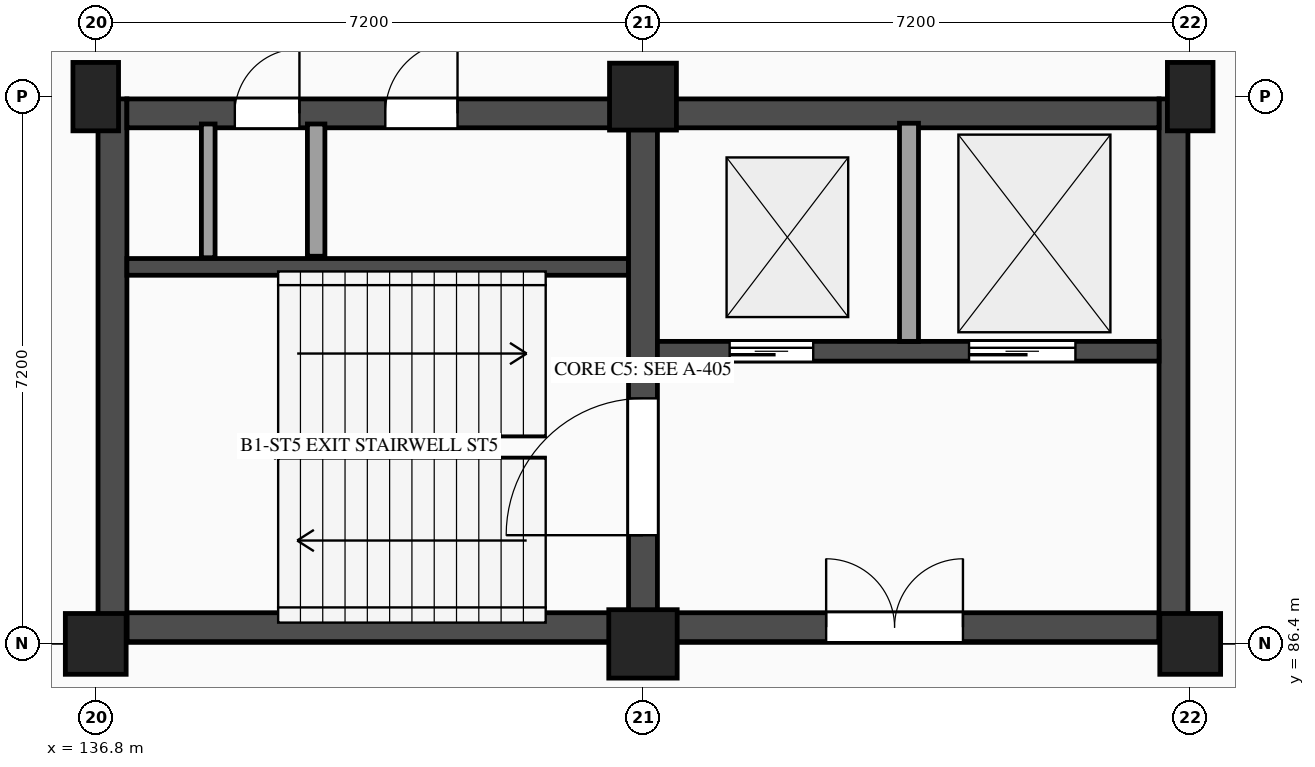
"""IFC4 building model, lengths in metres.
Left out: names, types, materials, properties, quantities, classifications, styles, units other than length and angle.
Written with IfcOpenShell. Run it as: python <this file> out.ifc"""

import sys

from ifc_helpers import new_model, si_unit, direction, frame, frame_2d, origin, origin_2d, place, context, subcontext, project, spatial, rectangle, extrude, element, fill, save


model = new_model("IFC4")
c1 = context("Model", 3, precision=1e-05, world=origin(), true_north=direction((0.0, 1.0)))
c2 = subcontext(c1, "Body", "Model", "MODEL_VIEW")
j1 = project(units=[si_unit("LENGTHUNIT", "METRE"), si_unit("PLANEANGLEUNIT", "RADIAN")], contexts=[c1])
p1 = place(None, origin())
s1 = spatial("IfcSite", under=j1, at=p1, CompositionType="ELEMENT")
p2 = place(p1, origin())
s2 = spatial("IfcBuilding", under=s1, at=p2, CompositionType="ELEMENT")
p3 = place(p2, frame((0.0, 0.0, -4.5)))
s3 = spatial("IfcBuildingStorey", under=s2, at=p3, CompositionType="ELEMENT", Elevation=-4.5)
p4 = place(p3, frame((136.8, 86.4, -0.45), z_axis=(0.0, 0.0, 1.0), x_axis=(1.0, 0.0, 0.0)))
e1 = element("IfcColumn", 1, at=p4, inside=s3, PredefinedType="COLUMN", context=c2, shape_type="SweptSolid", body=[
    extrude(rectangle(XDim=0.8, YDim=0.8, at=origin_2d()), origin(), (0.0, 0.0, 1.0), 4.95),
])
p5 = place(p3, frame((136.8, 93.6, -0.45), z_axis=(0.0, 0.0, 1.0), x_axis=(1.0, 0.0, 0.0)))
e2 = element("IfcColumn", 2, at=p5, inside=s3, PredefinedType="COLUMN", context=c2, shape_type="SweptSolid", body=[
    extrude(rectangle(XDim=0.6, YDim=0.9, at=origin_2d()), origin(), (0.0, 0.0, 1.0), 4.95),
])
p6 = place(p3, frame((144.0, 86.4, -0.45), z_axis=(0.0, 0.0, 1.0), x_axis=(1.0, 0.0, 0.0)))
e3 = element("IfcColumn", 3, at=p6, inside=s3, PredefinedType="COLUMN", context=c2, shape_type="SweptSolid", body=[
    extrude(rectangle(XDim=0.9, YDim=0.9, at=origin_2d()), origin(), (0.0, 0.0, 1.0), 4.95),
])
p7 = place(p3, frame((144.0, 93.6, -0.45), z_axis=(0.0, 0.0, 1.0), x_axis=(1.0, 0.0, 0.0)))
e4 = element("IfcColumn", 4, at=p7, inside=s3, PredefinedType="COLUMN", context=c2, shape_type="SweptSolid", body=[
    extrude(rectangle(XDim=0.88, YDim=0.88, at=origin_2d()), origin(), (0.0, 0.0, 1.0), 4.95),
])
p8 = place(p3, frame((151.2, 86.4, -0.45), z_axis=(0.0, 0.0, 1.0), x_axis=(1.0, 0.0, 0.0)))
e5 = element("IfcColumn", 5, at=p8, inside=s3, PredefinedType="COLUMN", context=c2, shape_type="SweptSolid", body=[
    extrude(rectangle(XDim=0.8, YDim=0.8, at=origin_2d()), origin(), (0.0, 0.0, 1.0), 4.95),
])
p9 = place(p3, frame((151.2, 93.6, -0.45), z_axis=(0.0, 0.0, 1.0), x_axis=(1.0, 0.0, 0.0)))
e6 = element("IfcColumn", 6, at=p9, inside=s3, PredefinedType="COLUMN", context=c2, shape_type="SweptSolid", body=[
    extrude(rectangle(XDim=0.6, YDim=0.9, at=origin_2d()), origin(), (0.0, 0.0, 1.0), 4.95),
])
p10 = place(p3, frame((137.21, 86.62, 0.0), z_axis=(0.0, 0.0, 1.0), x_axis=(1.0, 0.0, 0.0)))
e7 = element("IfcWall", 7, at=p10, inside=s3, PredefinedType="SHEAR", context=c2, shape_type="SweptSolid", body=[
    extrude(rectangle(XDim=6.6, YDim=0.38, at=frame_2d((3.3, 0.0))), origin(), (0.0, 0.0, 1.0), 4.19),
])
p11 = place(p3, frame((137.02, 93.57, 0.0), z_axis=(0.0, 0.0, 1.0), x_axis=(0.0, -1.0, 0.0)))
e8 = element("IfcWall", 8, at=p11, inside=s3, PredefinedType="SHEAR", context=c2, shape_type="SweptSolid", body=[
    extrude(rectangle(XDim=7.14, YDim=0.38, at=frame_2d((3.57, 0.0))), origin(), (0.0, 0.0, 1.0), 4.19),
])
p12 = place(p3, frame((137.21, 93.38, 0.0), z_axis=(0.0, 0.0, 1.0), x_axis=(1.0, 0.0, 0.0)))
e9 = element("IfcWall", 9, at=p12, inside=s3, PredefinedType="SHEAR", context=c2, shape_type="SweptSolid", body=[
    extrude(rectangle(XDim=6.6, YDim=0.38, at=frame_2d((3.3, 0.0))), origin(), (0.0, 0.0, 1.0), 4.19),
])
p13 = place(p12, frame((1.42, 0.0, 0.0)))
e10 = element("IfcOpeningElement", 10, at=p13, cuts=e9, PredefinedType="OPENING", context=c2, shape_type="SweptSolid", body=[
    extrude(rectangle(XDim=0.85, YDim=2.1, at=frame_2d((0.425, 1.05))), frame((0.0, 0.2, 0.0), z_axis=(0.0, -1.0, 0.0), x_axis=(1.0, 0.0, 0.0)), (0.0, 0.0, 1.0), 0.4),
])
p14 = place(p12, frame((3.4, 0.0, 0.0)))
e11 = element("IfcOpeningElement", 11, at=p14, cuts=e9, PredefinedType="OPENING", context=c2, shape_type="SweptSolid", body=[
    extrude(rectangle(XDim=0.95, YDim=2.15, at=frame_2d((0.475, 1.075))), frame((0.0, 0.2, 0.0), z_axis=(0.0, -1.0, 0.0), x_axis=(1.0, 0.0, 0.0)), (0.0, 0.0, 1.0), 0.4),
])
p15 = place(p3, frame((137.21, 91.36, 0.0), z_axis=(0.0, 0.0, 1.0), x_axis=(1.0, 0.0, 0.0)))
e12 = element("IfcWall", 12, at=p15, inside=s3, PredefinedType="SHEAR", context=c2, shape_type="SweptSolid", body=[
    extrude(rectangle(XDim=6.6, YDim=0.22, at=frame_2d((3.3, 0.0))), origin(), (0.0, 0.0, 1.0), 4.19),
])
p16 = place(p3, frame((139.7, 91.5, 0.0), z_axis=(0.0, 0.0, 1.0), x_axis=(0.0, 1.0, 0.0)))
e13 = element("IfcWall", 13, at=p16, inside=s3, PredefinedType="PARTITIONING", context=c2, shape_type="SweptSolid", body=[
    extrude(rectangle(XDim=1.74, YDim=0.23, at=frame_2d((0.87, 0.0))), origin(), (0.0, 0.0, 1.0), 4.19),
])
p17 = place(p3, frame((138.28, 91.48, 0.0), z_axis=(0.0, 0.0, 1.0), x_axis=(0.0, 1.0, 0.0)))
e14 = element("IfcWall", 14, at=p17, inside=s3, PredefinedType="PARTITIONING", context=c2, shape_type="SweptSolid", body=[
    extrude(rectangle(XDim=1.76, YDim=0.18, at=frame_2d((0.88, 0.0))), origin(), (0.0, 0.0, 1.0), 4.19),
])
p18 = place(p3, frame((144.0, 86.43, 0.0), z_axis=(0.0, 0.0, 1.0), x_axis=(0.0, 1.0, 0.0)))
e15 = element("IfcWall", 15, at=p18, inside=s3, PredefinedType="SHEAR", context=c2, shape_type="SweptSolid", body=[
    extrude(rectangle(XDim=7.14, YDim=0.38, at=frame_2d((3.57, 0.0))), origin(), (0.0, 0.0, 1.0), 4.19),
])
p19 = place(p18, frame((1.4, 0.0, 0.0)))
e16 = element("IfcOpeningElement", 16, at=p19, cuts=e15, PredefinedType="OPENING", context=c2, shape_type="SweptSolid", body=[
    extrude(rectangle(XDim=1.8, YDim=2.2, at=frame_2d((0.9, 1.1))), frame((0.0, 0.2, 0.0), z_axis=(0.0, -1.0, 0.0), x_axis=(1.0, 0.0, 0.0)), (0.0, 0.0, 1.0), 0.4),
])
p20 = place(p3, frame((144.19, 86.62, 0.0), z_axis=(0.0, 0.0, 1.0), x_axis=(1.0, 0.0, 0.0)))
e17 = element("IfcWall", 17, at=p20, inside=s3, PredefinedType="SHEAR", context=c2, shape_type="SweptSolid", body=[
    extrude(rectangle(XDim=6.6, YDim=0.38, at=frame_2d((3.3, 0.0))), origin(), (0.0, 0.0, 1.0), 4.19),
])
p21 = place(p20, frame((2.22, 0.0, 0.0)))
e18 = element("IfcOpeningElement", 18, at=p21, cuts=e17, PredefinedType="OPENING", context=c2, shape_type="SweptSolid", body=[
    extrude(rectangle(XDim=1.8, YDim=2.2, at=frame_2d((0.9, 1.1))), frame((0.0, 0.2, 0.0), z_axis=(0.0, -1.0, 0.0), x_axis=(1.0, 0.0, 0.0)), (0.0, 0.0, 1.0), 0.4),
])
p22 = place(p3, frame((150.98, 86.43, 0.0), z_axis=(0.0, 0.0, 1.0), x_axis=(0.0, 1.0, 0.0)))
e19 = element("IfcWall", 19, at=p22, inside=s3, PredefinedType="SHEAR", context=c2, shape_type="SweptSolid", body=[
    extrude(rectangle(XDim=7.14, YDim=0.38, at=frame_2d((3.57, 0.0))), origin(), (0.0, 0.0, 1.0), 4.19),
])
p23 = place(p3, frame((144.19, 93.38, 0.0), z_axis=(0.0, 0.0, 1.0), x_axis=(1.0, 0.0, 0.0)))
e20 = element("IfcWall", 20, at=p23, inside=s3, PredefinedType="SHEAR", context=c2, shape_type="SweptSolid", body=[
    extrude(rectangle(XDim=6.6, YDim=0.38, at=frame_2d((3.3, 0.0))), origin(), (0.0, 0.0, 1.0), 4.19),
])
p24 = place(p3, frame((144.19, 90.25, 0.0), z_axis=(0.0, 0.0, 1.0), x_axis=(1.0, 0.0, 0.0)))
e21 = element("IfcWall", 21, at=p24, inside=s3, PredefinedType="SHEAR", context=c2, shape_type="SweptSolid", body=[
    extrude(rectangle(XDim=6.6, YDim=0.26, at=frame_2d((3.3, 0.0))), origin(), (0.0, 0.0, 1.0), 4.19),
])
p25 = place(p24, frame((0.95, 0.0, 0.0)))
e22 = element("IfcOpeningElement", 22, at=p25, cuts=e21, PredefinedType="OPENING", context=c2, shape_type="SweptSolid", body=[
    extrude(rectangle(XDim=1.1, YDim=2.2, at=frame_2d((0.55, 1.1))), frame((0.0, 0.14, 0.0), z_axis=(0.0, -1.0, 0.0), x_axis=(1.0, 0.0, 0.0)), (0.0, 0.0, 1.0), 0.28),
])
p26 = place(p24, frame((4.1, 0.0, 0.0)))
e23 = element("IfcOpeningElement", 23, at=p26, cuts=e21, PredefinedType="OPENING", context=c2, shape_type="SweptSolid", body=[
    extrude(rectangle(XDim=1.4, YDim=2.3, at=frame_2d((0.7, 1.15))), frame((0.0, 0.14, 0.0), z_axis=(0.0, -1.0, 0.0), x_axis=(1.0, 0.0, 0.0)), (0.0, 0.0, 1.0), 0.28),
])
p27 = place(p3, frame((147.5, 90.38, 0.0), z_axis=(0.0, 0.0, 1.0), x_axis=(0.0, 1.0, 0.0)))
e24 = element("IfcWall", 24, at=p27, inside=s3, PredefinedType="PARTITIONING", context=c2, shape_type="SweptSolid", body=[
    extrude(rectangle(XDim=2.87, YDim=0.25, at=frame_2d((1.435, 0.0))), origin(), (0.0, 0.0, 1.0), 4.19),
])
p28 = place(p13, origin())
e25 = element("IfcDoor", 25, at=p28, inside=s3, OperationType="SINGLE_SWING_RIGHT", PredefinedType="DOOR", context=c2, shape_type="SweptSolid", body=[
    extrude(rectangle(XDim=0.85, YDim=2.1, at=frame_2d((0.425, 1.05))), frame((0.0, 0.025, 0.0), z_axis=(0.0, -1.0, 0.0), x_axis=(1.0, 0.0, 0.0)), (0.0, 0.0, 1.0), 0.05),
])
fill(e10, e25)
p29 = place(p19, origin())
e26 = element("IfcDoor", 26, at=p29, inside=s3, OperationType="SINGLE_SWING_LEFT", PredefinedType="DOOR", context=c2, shape_type="SweptSolid", body=[
    extrude(rectangle(XDim=1.8, YDim=2.2, at=frame_2d((0.9, 1.1))), frame((0.0, 0.025, 0.0), z_axis=(0.0, -1.0, 0.0), x_axis=(1.0, 0.0, 0.0)), (0.0, 0.0, 1.0), 0.05),
])
fill(e16, e26)
p30 = place(p14, origin())
e27 = element("IfcDoor", 27, at=p30, inside=s3, OperationType="SINGLE_SWING_RIGHT", PredefinedType="DOOR", context=c2, shape_type="SweptSolid", body=[
    extrude(rectangle(XDim=0.95, YDim=2.15, at=frame_2d((0.475, 1.075))), frame((0.0, 0.025, 0.0), z_axis=(0.0, -1.0, 0.0), x_axis=(1.0, 0.0, 0.0)), (0.0, 0.0, 1.0), 0.05),
])
fill(e11, e27)
p31 = place(p25, origin())
e28 = element("IfcDoor", 28, at=p31, inside=s3, OperationType="SLIDING_TO_LEFT", PredefinedType="DOOR", context=c2, shape_type="SweptSolid", body=[
    extrude(rectangle(XDim=1.1, YDim=2.2, at=frame_2d((0.55, 1.1))), frame((0.0, 0.025, 0.0), z_axis=(0.0, -1.0, 0.0), x_axis=(1.0, 0.0, 0.0)), (0.0, 0.0, 1.0), 0.05),
])
fill(e22, e28)
p32 = place(p26, origin())
e29 = element("IfcDoor", 29, at=p32, inside=s3, OperationType="SLIDING_TO_RIGHT", PredefinedType="DOOR", context=c2, shape_type="SweptSolid", body=[
    extrude(rectangle(XDim=1.4, YDim=2.3, at=frame_2d((0.7, 1.15))), frame((0.0, 0.025, 0.0), z_axis=(0.0, -1.0, 0.0), x_axis=(1.0, 0.0, 0.0)), (0.0, 0.0, 1.0), 0.05),
])
fill(e23, e29)
p33 = place(p21, origin())
e30 = element("IfcDoor", 30, at=p33, inside=s3, OperationType="DOUBLE_DOOR_SINGLE_SWING", PredefinedType="DOOR", context=c2, shape_type="SweptSolid", body=[
    extrude(rectangle(XDim=1.8, YDim=2.2, at=frame_2d((0.9, 1.1))), frame((0.0, 0.025, 0.0), z_axis=(0.0, -1.0, 0.0), x_axis=(1.0, 0.0, 0.0)), (0.0, 0.0, 1.0), 0.05),
])
fill(e18, e30)
save(model, sys.argv[1])
